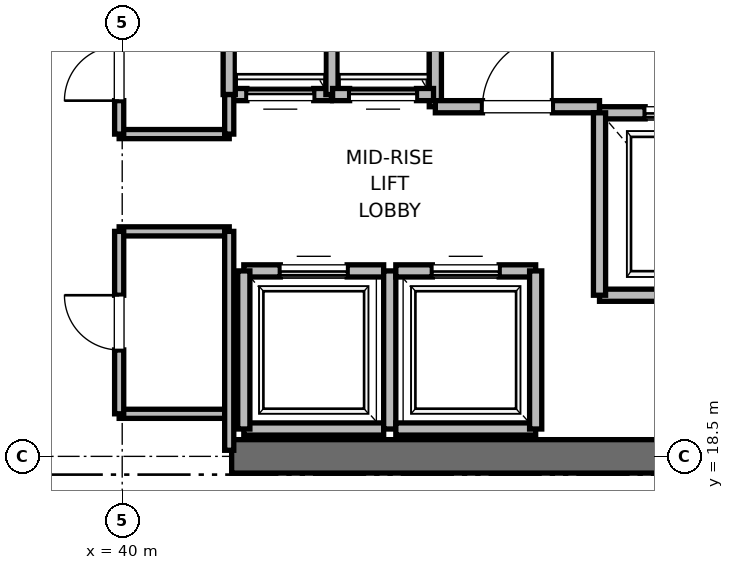
"""IFC4 building model, lengths in metres.
Left out: names, types, materials, properties, quantities, classifications, styles, units other than length and angle.
Written with IfcOpenShell. Run it as: python <this file> out.ifc"""

import sys

from ifc_helpers import new_model, si_unit, direction, frame, frame_2d, origin, place, context, subcontext, project, spatial, rectangle, extrude, element, fill, save


model = new_model("IFC4")
c1 = context("Model", 3, precision=1e-05, world=origin(), true_north=direction((0.0, 1.0)))
c2 = subcontext(c1, "Body", "Model", "MODEL_VIEW")
j1 = project(units=[si_unit("LENGTHUNIT", "METRE"), si_unit("PLANEANGLEUNIT", "RADIAN")], contexts=[c1])
p1 = place(None, origin())
s1 = spatial("IfcSite", under=j1, at=p1, CompositionType="ELEMENT")
p2 = place(p1, origin())
s2 = spatial("IfcBuilding", under=s1, at=p2, CompositionType="ELEMENT")
p3 = place(p2, frame((0.0, 0.0, 132.4)))
s3 = spatial("IfcBuildingStorey", under=s2, at=p3, CompositionType="ELEMENT", Elevation=132.4)
p4 = place(p3, frame((41.8, 18.5, 0.0), z_axis=(0.0, 0.0, 1.0), x_axis=(1.0, 0.0, 0.0)))
e1 = element("IfcWall", 1, at=p4, inside=s3, PredefinedType="SHEAR", context=c2, shape_type="SweptSolid", body=[
    extrude(rectangle(XDim=9.2, YDim=0.55, at=frame_2d((4.6, 0.0))), origin(), (0.0, 0.0, 1.0), 3.775),
])
p5 = place(p3, frame((45.15, 24.25, 0.0), z_axis=(0.0, 0.0, 1.0), x_axis=(0.0, 1.0, 0.0)))
e2 = element("IfcWall", 2, at=p5, inside=s3, PredefinedType="PARTITIONING", context=c2, shape_type="SweptSolid", body=[
    extrude(rectangle(XDim=3.37, YDim=0.2, at=frame_2d((1.685, 0.0))), origin(), (0.0, 0.0, 1.0), 3.775),
])
p6 = place(p3, frame((45.15, 24.25, 0.0), z_axis=(0.0, 0.0, 1.0), x_axis=(1.0, 0.0, 0.0)))
e3 = element("IfcWall", 3, at=p6, inside=s3, PredefinedType="PARTITIONING", context=c2, shape_type="SweptSolid", body=[
    extrude(rectangle(XDim=2.7, YDim=0.2, at=frame_2d((1.35, 0.0))), origin(), (0.0, 0.0, 1.0), 3.775),
])
p7 = place(p6, frame((0.775, 0.0, 0.0)))
e4 = element("IfcOpeningElement", 4, at=p7, cuts=e3, PredefinedType="OPENING", context=c2, shape_type="SweptSolid", body=[
    extrude(rectangle(XDim=1.15, YDim=2.2, at=frame_2d((0.575, 1.1))), frame((0.0, 0.1, 0.0), z_axis=(0.0, -1.0, 0.0), x_axis=(1.0, 0.0, 0.0)), (0.0, 0.0, 1.0), 0.2),
])
p8 = place(p3, frame((47.85, 21.15, 0.0), z_axis=(0.0, 0.0, 1.0), x_axis=(1.0, 0.0, 0.0)))
e5 = element("IfcWall", 5, at=p8, inside=s3, PredefinedType="SOLIDWALL", context=c2, shape_type="SweptSolid", body=[
    extrude(rectangle(XDim=2.6, YDim=0.2, at=frame_2d((1.3, 0.0))), origin(), (0.0, 0.0, 1.0), 3.775),
])
p9 = place(p3, frame((50.45, 24.15, 0.0), z_axis=(0.0, 0.0, 1.0), x_axis=(-1.0, 0.0, 0.0)))
e6 = element("IfcWall", 6, at=p9, inside=s3, PredefinedType="SOLIDWALL", context=c2, shape_type="SweptSolid", body=[
    extrude(rectangle(XDim=2.6, YDim=0.2, at=frame_2d((1.3, 0.0))), origin(), (0.0, 0.0, 1.0), 2.755),
])
p10 = place(p9, frame((0.75, 0.0, 0.0)))
e7 = element("IfcOpeningElement", 7, at=p10, cuts=e6, PredefinedType="OPENING", context=c2, shape_type="SweptSolid", body=[
    extrude(rectangle(XDim=1.1, YDim=2.2, at=frame_2d((0.55, 1.1))), frame((0.0, 0.1, 0.0), z_axis=(0.0, -1.0, 0.0), x_axis=(1.0, 0.0, 0.0)), (0.0, 0.0, 1.0), 0.2),
])
p11 = place(p3, frame((47.85, 24.15, 0.0), z_axis=(0.0, 0.0, 1.0), x_axis=(0.0, -1.0, 0.0)))
e8 = element("IfcWall", 8, at=p11, inside=s3, PredefinedType="SOLIDWALL", context=c2, shape_type="SweptSolid", body=[
    extrude(rectangle(XDim=3.0, YDim=0.2, at=frame_2d((1.5, 0.0))), origin(), (0.0, 0.0, 1.0), 3.775),
])
p12 = place(p3, frame((42.0, 18.95, 0.0), z_axis=(0.0, 0.0, 1.0), x_axis=(1.0, 0.0, 0.0)))
e9 = element("IfcWall", 9, at=p12, inside=s3, PredefinedType="SOLIDWALL", context=c2, shape_type="SweptSolid", body=[
    extrude(rectangle(XDim=2.3, YDim=0.2, at=frame_2d((1.15, 0.0))), origin(), (0.0, 0.0, 1.0), 2.755),
])
p13 = place(p3, frame((44.3, 21.55, 0.0), z_axis=(0.0, 0.0, 1.0), x_axis=(-1.0, 0.0, 0.0)))
e10 = element("IfcWall", 10, at=p13, inside=s3, PredefinedType="SOLIDWALL", context=c2, shape_type="SweptSolid", body=[
    extrude(rectangle(XDim=2.3, YDim=0.2, at=frame_2d((1.15, 0.0))), origin(), (0.0, 0.0, 1.0), 3.775),
])
p14 = place(p13, frame((0.6, 0.0, 0.0)))
e11 = element("IfcOpeningElement", 11, at=p14, cuts=e10, PredefinedType="OPENING", context=c2, shape_type="SweptSolid", body=[
    extrude(rectangle(XDim=1.1, YDim=2.2, at=frame_2d((0.55, 1.1))), frame((0.0, 0.1, 0.0), z_axis=(0.0, -1.0, 0.0), x_axis=(1.0, 0.0, 0.0)), (0.0, 0.0, 1.0), 0.2),
])
p15 = place(p3, frame((42.0, 21.55, 0.0), z_axis=(0.0, 0.0, 1.0), x_axis=(0.0, -1.0, 0.0)))
e12 = element("IfcWall", 12, at=p15, inside=s3, PredefinedType="SOLIDWALL", context=c2, shape_type="SweptSolid", body=[
    extrude(rectangle(XDim=2.6, YDim=0.2, at=frame_2d((1.3, 0.0))), origin(), (0.0, 0.0, 1.0), 2.755),
])
p16 = place(p3, frame((44.4, 18.95, 0.0), z_axis=(0.0, 0.0, 1.0), x_axis=(0.0, 1.0, 0.0)))
e13 = element("IfcWall", 13, at=p16, inside=s3, PredefinedType="SOLIDWALL", context=c2, shape_type="SweptSolid", body=[
    extrude(rectangle(XDim=2.6, YDim=0.2, at=frame_2d((1.3, 0.0))), origin(), (0.0, 0.0, 1.0), 3.775),
])
p17 = place(p3, frame((44.5, 18.95, 0.0), z_axis=(0.0, 0.0, 1.0), x_axis=(1.0, 0.0, 0.0)))
e14 = element("IfcWall", 14, at=p17, inside=s3, PredefinedType="SOLIDWALL", context=c2, shape_type="SweptSolid", body=[
    extrude(rectangle(XDim=2.3, YDim=0.2, at=frame_2d((1.15, 0.0))), origin(), (0.0, 0.0, 1.0), 3.775),
])
p18 = place(p3, frame((46.8, 21.55, 0.0), z_axis=(0.0, 0.0, 1.0), x_axis=(-1.0, 0.0, 0.0)))
e15 = element("IfcWall", 15, at=p18, inside=s3, PredefinedType="SOLIDWALL", context=c2, shape_type="SweptSolid", body=[
    extrude(rectangle(XDim=2.3, YDim=0.2, at=frame_2d((1.15, 0.0))), origin(), (0.0, 0.0, 1.0), 3.775),
])
p19 = place(p18, frame((0.6, 0.0, 0.0)))
e16 = element("IfcOpeningElement", 16, at=p19, cuts=e15, PredefinedType="OPENING", context=c2, shape_type="SweptSolid", body=[
    extrude(rectangle(XDim=1.1, YDim=2.2, at=frame_2d((0.55, 1.1))), frame((0.0, 0.1, 0.0), z_axis=(0.0, -1.0, 0.0), x_axis=(1.0, 0.0, 0.0)), (0.0, 0.0, 1.0), 0.2),
])
p20 = place(p3, frame((46.8, 18.95, 0.0), z_axis=(0.0, 0.0, 1.0), x_axis=(0.0, 1.0, 0.0)))
e17 = element("IfcWall", 17, at=p20, inside=s3, PredefinedType="SOLIDWALL", context=c2, shape_type="SweptSolid", body=[
    extrude(rectangle(XDim=2.6, YDim=0.2, at=frame_2d((1.3, 0.0))), origin(), (0.0, 0.0, 1.0), 3.775),
])
p21 = place(p3, frame((41.76, 24.45, 0.0), z_axis=(0.0, 0.0, 1.0), x_axis=(1.0, 0.0, 0.0)))
e18 = element("IfcWall", 18, at=p21, inside=s3, PredefinedType="SOLIDWALL", context=c2, shape_type="SweptSolid", body=[
    extrude(rectangle(XDim=1.68, YDim=0.2, at=frame_2d((0.84, 0.0))), origin(), (0.0, 0.0, 1.0), 3.775),
])
p22 = place(p21, frame((0.29, 0.0, 0.0)))
e19 = element("IfcOpeningElement", 19, at=p22, cuts=e18, PredefinedType="OPENING", context=c2, shape_type="SweptSolid", body=[
    extrude(rectangle(XDim=1.1, YDim=2.2, at=frame_2d((0.55, 1.1))), frame((0.0, 0.1, 0.0), z_axis=(0.0, -1.0, 0.0), x_axis=(1.0, 0.0, 0.0)), (0.0, 0.0, 1.0), 0.2),
])
for number, where, z_axis, x_axis in (
    (20, (41.76, 27.05, 0.0), (0.0, 0.0, 1.0), (0.0, -1.0, 0.0)),
    (21, (43.45, 24.45, 0.0), (0.0, 0.0, 1.0), (0.0, 1.0, 0.0)),
):
    element("IfcWall", number, at=place(p3, frame(where, z_axis=z_axis, x_axis=x_axis)), inside=s3, PredefinedType="SOLIDWALL", context=c2, shape_type="SweptSolid", body=[
        extrude(rectangle(XDim=2.6, YDim=0.2, at=frame_2d((1.3, 0.0))), origin(), (0.0, 0.0, 1.0), 3.775),
    ])
p23 = place(p3, frame((43.46, 24.45, 0.0), z_axis=(0.0, 0.0, 1.0), x_axis=(1.0, 0.0, 0.0)))
e22 = element("IfcWall", 22, at=p23, inside=s3, PredefinedType="SOLIDWALL", context=c2, shape_type="SweptSolid", body=[
    extrude(rectangle(XDim=1.66, YDim=0.2, at=frame_2d((0.83, 0.0))), origin(), (0.0, 0.0, 1.0), 3.775),
])
p24 = place(p23, frame((0.28, 0.0, 0.0)))
e23 = element("IfcOpeningElement", 23, at=p24, cuts=e22, PredefinedType="OPENING", context=c2, shape_type="SweptSolid", body=[
    extrude(rectangle(XDim=1.1, YDim=2.2, at=frame_2d((0.55, 1.1))), frame((0.0, 0.1, 0.0), z_axis=(0.0, -1.0, 0.0), x_axis=(1.0, 0.0, 0.0)), (0.0, 0.0, 1.0), 0.2),
])
for number, where, z_axis, x_axis in (
    (24, (39.95, 19.2, 0.0), (0.0, 0.0, 1.0), (1.0, 0.0, 0.0)),
    (25, (39.95, 22.2, 0.0), (0.0, 0.0, 1.0), (1.0, 0.0, 0.0)),
    (26, (39.95, 23.8, 0.0), (0.0, 0.0, 1.0), (1.0, 0.0, 0.0)),
):
    element("IfcWall", number, at=place(p3, frame(where, z_axis=z_axis, x_axis=x_axis)), inside=s3, PredefinedType="PARTITIONING", context=c2, shape_type="SweptSolid", body=[
        extrude(rectangle(XDim=1.81, YDim=0.15, at=frame_2d((0.905, 0.0))), origin(), (0.0, 0.0, 1.0), 2.85),
    ])
p25 = place(p3, frame((41.76, 18.6, 0.0), z_axis=(0.0, 0.0, 1.0), x_axis=(0.0, 1.0, 0.0)))
e27 = element("IfcWall", 27, at=p25, inside=s3, PredefinedType="PARTITIONING", context=c2, shape_type="SweptSolid", body=[
    extrude(rectangle(XDim=3.6, YDim=0.15, at=frame_2d((1.8, 0.0))), origin(), (0.0, 0.0, 1.0), 2.755),
])
p26 = place(p3, frame((41.76, 23.8, 0.0), z_axis=(0.0, 0.0, 1.0), x_axis=(0.0, 1.0, 0.0)))
e28 = element("IfcWall", 28, at=p26, inside=s3, PredefinedType="PARTITIONING", context=c2, shape_type="SweptSolid", body=[
    extrude(rectangle(XDim=0.65, YDim=0.15, at=frame_2d((0.325, 0.0))), origin(), (0.0, 0.0, 1.0), 2.85),
])
p27 = place(p3, frame((39.95, 19.2, 0.0), z_axis=(0.0, 0.0, 1.0), x_axis=(0.0, 1.0, 0.0)))
e29 = element("IfcWall", 29, at=p27, inside=s3, PredefinedType="PARTITIONING", context=c2, shape_type="SweptSolid", body=[
    extrude(rectangle(XDim=3.0, YDim=0.15, at=frame_2d((1.5, 0.0))), origin(), (0.0, 0.0, 1.0), 2.85),
])
p28 = place(p27, frame((1.05, 0.0, 0.0)))
e30 = element("IfcOpeningElement", 30, at=p28, cuts=e29, PredefinedType="OPENING", context=c2, shape_type="SweptSolid", body=[
    extrude(rectangle(XDim=0.9, YDim=2.1, at=frame_2d((0.45, 1.05))), frame((0.0, 0.075, 0.0), z_axis=(0.0, -1.0, 0.0), x_axis=(1.0, 0.0, 0.0)), (0.0, 0.0, 1.0), 0.15),
])
p29 = place(p3, frame((39.95, 23.8, 0.0), z_axis=(0.0, 0.0, 1.0), x_axis=(0.0, 1.0, 0.0)))
e31 = element("IfcWall", 31, at=p29, inside=s3, PredefinedType="PARTITIONING", context=c2, shape_type="SweptSolid", body=[
    extrude(rectangle(XDim=2.0, YDim=0.15, at=frame_2d((1.0, 0.0))), origin(), (0.0, 0.0, 1.0), 2.85),
])
p30 = place(p29, frame((0.55, 0.0, 0.0)))
e32 = element("IfcOpeningElement", 32, at=p30, cuts=e31, PredefinedType="OPENING", context=c2, shape_type="SweptSolid", body=[
    extrude(rectangle(XDim=0.9, YDim=2.1, at=frame_2d((0.45, 1.05))), frame((0.0, 0.075, 0.0), z_axis=(0.0, -1.0, 0.0), x_axis=(1.0, 0.0, 0.0)), (0.0, 0.0, 1.0), 0.15),
])
p31 = place(p7, origin())
e33 = element("IfcDoor", 33, at=p31, inside=s3, OperationType="SINGLE_SWING_RIGHT", PredefinedType="DOOR", context=c2, shape_type="SweptSolid", body=[
    extrude(rectangle(XDim=1.15, YDim=2.2, at=frame_2d((0.575, 1.1))), frame((0.0, 0.025, 0.0), z_axis=(0.0, -1.0, 0.0), x_axis=(1.0, 0.0, 0.0)), (0.0, 0.0, 1.0), 0.05),
])
fill(e4, e33)
p32 = place(p10, origin())
e34 = element("IfcDoor", 34, at=p32, inside=s3, OperationType="SLIDING_TO_RIGHT", PredefinedType="DOOR", context=c2, shape_type="SweptSolid", body=[
    extrude(rectangle(XDim=1.1, YDim=2.2, at=frame_2d((0.55, 1.1))), frame((0.0, 0.025, 0.0), z_axis=(0.0, -1.0, 0.0), x_axis=(1.0, 0.0, 0.0)), (0.0, 0.0, 1.0), 0.05),
])
fill(e7, e34)
p33 = place(p14, origin())
e35 = element("IfcDoor", 35, at=p33, inside=s3, OperationType="SLIDING_TO_RIGHT", PredefinedType="DOOR", context=c2, shape_type="SweptSolid", body=[
    extrude(rectangle(XDim=1.1, YDim=2.2, at=frame_2d((0.55, 1.1))), frame((0.0, 0.025, 0.0), z_axis=(0.0, -1.0, 0.0), x_axis=(1.0, 0.0, 0.0)), (0.0, 0.0, 1.0), 0.05),
])
fill(e11, e35)
p34 = place(p19, origin())
e36 = element("IfcDoor", 36, at=p34, inside=s3, OperationType="SLIDING_TO_RIGHT", PredefinedType="DOOR", context=c2, shape_type="SweptSolid", body=[
    extrude(rectangle(XDim=1.1, YDim=2.2, at=frame_2d((0.55, 1.1))), frame((0.0, 0.025, 0.0), z_axis=(0.0, -1.0, 0.0), x_axis=(1.0, 0.0, 0.0)), (0.0, 0.0, 1.0), 0.05),
])
fill(e16, e36)
p35 = place(p22, origin())
e37 = element("IfcDoor", 37, at=p35, inside=s3, OperationType="SLIDING_TO_RIGHT", PredefinedType="DOOR", context=c2, shape_type="SweptSolid", body=[
    extrude(rectangle(XDim=1.1, YDim=2.2, at=frame_2d((0.55, 1.1))), frame((0.0, 0.025, 0.0), z_axis=(0.0, -1.0, 0.0), x_axis=(1.0, 0.0, 0.0)), (0.0, 0.0, 1.0), 0.05),
])
fill(e19, e37)
p36 = place(p24, origin())
e38 = element("IfcDoor", 38, at=p36, inside=s3, OperationType="SLIDING_TO_RIGHT", PredefinedType="DOOR", context=c2, shape_type="SweptSolid", body=[
    extrude(rectangle(XDim=1.1, YDim=2.2, at=frame_2d((0.55, 1.1))), frame((0.0, 0.025, 0.0), z_axis=(0.0, -1.0, 0.0), x_axis=(1.0, 0.0, 0.0)), (0.0, 0.0, 1.0), 0.05),
])
fill(e23, e38)
p37 = place(p28, origin())
e39 = element("IfcDoor", 39, at=p37, inside=s3, OperationType="SINGLE_SWING_RIGHT", PredefinedType="DOOR", context=c2, shape_type="SweptSolid", body=[
    extrude(rectangle(XDim=0.9, YDim=2.1, at=frame_2d((0.45, 1.05))), frame((0.0, 0.025, 0.0), z_axis=(0.0, -1.0, 0.0), x_axis=(1.0, 0.0, 0.0)), (0.0, 0.0, 1.0), 0.05),
])
fill(e30, e39)
p38 = place(p30, origin())
e40 = element("IfcDoor", 40, at=p38, inside=s3, OperationType="SINGLE_SWING_LEFT", PredefinedType="DOOR", context=c2, shape_type="SweptSolid", body=[
    extrude(rectangle(XDim=0.9, YDim=2.1, at=frame_2d((0.45, 1.05))), frame((0.0, 0.025, 0.0), z_axis=(0.0, -1.0, 0.0), x_axis=(1.0, 0.0, 0.0)), (0.0, 0.0, 1.0), 0.05),
])
fill(e32, e40)
save(model, sys.argv[1])
